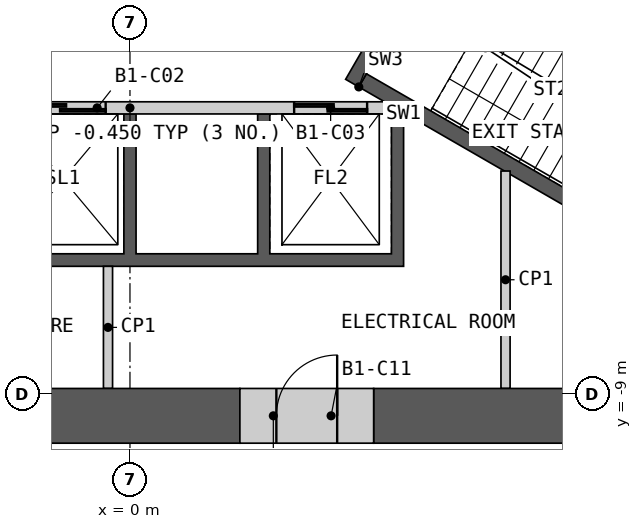
"""IFC4 building model, lengths in metres.
Left out: names, types, materials, properties, quantities, classifications, styles, units other than length and angle.
Written with IfcOpenShell. Run it as: python <this file> out.ifc"""

import sys

from ifc_helpers import new_model, si_unit, direction, frame, frame_2d, origin, place, context, subcontext, project, spatial, polyline, rectangle, outline, extrude, element, fill, save


model = new_model("IFC4")
c1 = context("Model", 3, precision=1e-05, world=origin(), true_north=direction((0.0, 1.0)))
c2 = subcontext(c1, "Body", "Model", "MODEL_VIEW")
j1 = project(units=[si_unit("LENGTHUNIT", "METRE"), si_unit("PLANEANGLEUNIT", "RADIAN")], contexts=[c1])
p1 = place(None, origin())
s1 = spatial("IfcSite", under=j1, at=p1, CompositionType="ELEMENT")
p2 = place(p1, origin())
s2 = spatial("IfcBuilding", under=s1, at=p2, CompositionType="ELEMENT")
p3 = place(p2, frame((0.0, 0.0, -4.2)))
s3 = spatial("IfcBuildingStorey", under=s2, at=p3, CompositionType="ELEMENT", Elevation=-4.2)
p4 = place(p3, frame((31.74, -10.542, 0.0), z_axis=(0.0, 0.0, 1.0), x_axis=(-0.500000005698, 0.866025400495, 0.0)))
e1 = element("IfcWall", 1, at=p4, inside=s3, PredefinedType="SOLIDWALL", context=c2, shape_type="SweptSolid", body=[
    extrude(rectangle(XDim=50.0, YDim=0.6, at=frame_2d((25.0, 0.0))), origin(), (0.0, 0.0, 1.0), 3.75),
])
p5 = place(p3, origin())
e2 = element("IfcWall", 2, at=p5, inside=s3, PredefinedType="SHEAR", context=c2, shape_type="SweptSolid", body=[
    extrude(outline(polyline([(4.5, -4.4), (4.5, -6.906), (-4.5, -6.906), (-4.5, -4.4), (-4.3, -4.4), (-4.3, -6.7), (-2.3, -6.7), (-2.3, -4.4), (-2.1, -4.4), (-2.1, -6.7), (-0.1, -6.7), (-0.1, -4.4), (0.1, -4.4), (0.1, -6.7), (2.1, -6.7), (2.1, -4.4), (2.3, -4.4), (2.3, -6.7), (4.3, -6.7), (4.3, -4.4), (4.5, -4.4)])), origin(), (0.0, 0.0, 1.0), 3.75),
])
p6 = place(p3, frame((-4.187, -4.3, 0.0), z_axis=(0.0, 0.0, 1.0), x_axis=(1.0, 0.0, 0.0)))
e3 = element("IfcWall", 3, at=p6, inside=s3, PredefinedType="SOLIDWALL", context=c2, shape_type="SweptSolid", body=[
    extrude(rectangle(XDim=8.373, YDim=0.2, at=frame_2d((4.187, 0.0))), origin(), (0.0, 0.0, 1.0), 3.75),
])
p7 = place(p6, frame((0.287, 0.0, 0.0)))
e4 = element("IfcOpeningElement", 4, at=p7, cuts=e3, PredefinedType="OPENING", context=c2, shape_type="SweptSolid", body=[
    extrude(rectangle(XDim=1.2, YDim=2.1, at=frame_2d((0.6, 1.05))), frame((0.0, 0.11, 0.0), z_axis=(0.0, -1.0, 0.0), x_axis=(1.0, 0.0, 0.0)), (0.0, 0.0, 1.0), 0.22),
])
p8 = place(p6, frame((2.387, 0.0, 0.0)))
e5 = element("IfcOpeningElement", 5, at=p8, cuts=e3, PredefinedType="OPENING", context=c2, shape_type="SweptSolid", body=[
    extrude(rectangle(XDim=1.4, YDim=2.1, at=frame_2d((0.7, 1.05))), frame((0.0, 0.11, 0.0), z_axis=(0.0, -1.0, 0.0), x_axis=(1.0, 0.0, 0.0)), (0.0, 0.0, 1.0), 0.22),
])
p9 = place(p6, frame((6.887, 0.0, 0.0)))
e6 = element("IfcOpeningElement", 6, at=p9, cuts=e3, PredefinedType="OPENING", context=c2, shape_type="SweptSolid", body=[
    extrude(rectangle(XDim=1.2, YDim=2.1, at=frame_2d((0.6, 1.05))), frame((0.0, 0.11, 0.0), z_axis=(0.0, -1.0, 0.0), x_axis=(1.0, 0.0, 0.0)), (0.0, 0.0, 1.0), 0.22),
])
p10 = place(p3, origin())
e7 = element("IfcWall", 7, at=p10, inside=s3, PredefinedType="SHEAR", context=c2, shape_type="SweptSolid", body=[
    extrude(outline(polyline([(3.763, -3.956), (8.83, -6.881), (8.738, -6.539), (3.888, -3.739), (3.763, -3.956)])), origin(), (0.0, 0.0, 1.0), 3.75),
])
p11 = place(p3, origin())
e8 = element("IfcWall", 8, at=p11, inside=s3, PredefinedType="SHEAR", context=c2, shape_type="SweptSolid", body=[
    extrude(outline(polyline([(10.032, -4.298), (10.374, -4.206), (5.307, -1.281), (5.182, -1.498), (10.032, -4.298)])), origin(), (0.0, 0.0, 1.0), 3.75),
])
p12 = place(p3, frame((3.655, -3.893, 0.0), z_axis=(0.0, 0.0, 1.0), x_axis=(0.499982516597, 0.866035497597, 0.0)))
e9 = element("IfcWall", 9, at=p12, inside=s3, PredefinedType="SHEAR", context=c2, shape_type="SweptSolid", body=[
    extrude(rectangle(XDim=3.088, YDim=0.25, at=frame_2d((1.544, 0.0))), origin(), (0.0, 0.0, 1.0), 3.75),
])
p13 = place(p12, frame((0.994, 0.0, 0.0)))
e10 = element("IfcOpeningElement", 10, at=p13, cuts=e9, PredefinedType="OPENING", context=c2, shape_type="SweptSolid", body=[
    extrude(rectangle(XDim=1.1, YDim=2.1, at=frame_2d((0.55, 1.05))), frame((0.0, 0.135, 0.0), z_axis=(0.0, -1.0, 0.0), x_axis=(1.0, 0.0, 0.0)), (0.0, 0.0, 1.0), 0.27),
])
p14 = place(p3, frame((6.177, -8.915, 0.0), z_axis=(0.0, 0.0, 1.0), x_axis=(0.0, 1.0, 0.0)))
e11 = element("IfcWall", 11, at=p14, inside=s3, PredefinedType="PARTITIONING", context=c2, shape_type="SweptSolid", body=[
    extrude(rectangle(XDim=3.576, YDim=0.15, at=frame_2d((1.788, 0.0))), origin(), (0.0, 0.0, 1.0), 3.75),
])
p15 = place(p3, frame((-0.361, -8.915, 0.0), z_axis=(0.0, 0.0, 1.0), x_axis=(0.0, 1.0, 0.0)))
e12 = element("IfcWall", 12, at=p15, inside=s3, PredefinedType="PARTITIONING", context=c2, shape_type="SweptSolid", body=[
    extrude(rectangle(XDim=2.009, YDim=0.15, at=frame_2d((1.004, 0.0))), origin(), (0.0, 0.0, 1.0), 3.75),
])
p16 = place(p3, frame((4.008, -9.365, 0.0), z_axis=(0.0, 0.0, 1.0), x_axis=(1.0, 0.0, 0.0)))
e13 = element("IfcWall", 13, at=p16, inside=s3, PredefinedType="SHEAR", context=c2, shape_type="SweptSolid", body=[
    extrude(rectangle(XDim=5.739, YDim=0.9, at=frame_2d((2.869, 0.0))), origin(), (0.0, 0.0, 1.0), 3.75),
])
p17 = place(p3, frame((-1.55, -9.365, 0.0), z_axis=(0.0, 0.0, 1.0), x_axis=(1.0, 0.0, 0.0)))
e14 = element("IfcWall", 14, at=p17, inside=s3, PredefinedType="SHEAR", context=c2, shape_type="SweptSolid", body=[
    extrude(rectangle(XDim=3.357, YDim=0.9, at=frame_2d((1.679, 0.0))), origin(), (0.0, 0.0, 1.0), 3.75),
])
p18 = place(p3, frame((1.808, -9.365, 0.0), z_axis=(0.0, 0.0, 1.0), x_axis=(1.0, 0.0, 0.0)))
e15 = element("IfcWall", 15, at=p18, inside=s3, PredefinedType="SHEAR", context=c2, shape_type="SweptSolid", body=[
    extrude(rectangle(XDim=2.2, YDim=0.9, at=frame_2d((1.1, 0.0))), origin(), (0.0, 0.0, 1.0), 3.75),
])
p19 = place(p18, frame((0.6, 0.0, 0.0)))
e16 = element("IfcOpeningElement", 16, at=p19, cuts=e15, PredefinedType="OPENING", context=c2, shape_type="SweptSolid", body=[
    extrude(rectangle(XDim=1.0, YDim=2.1, at=frame_2d((0.5, 1.05))), frame((0.0, 0.46, 0.0), z_axis=(0.0, -1.0, 0.0), x_axis=(1.0, 0.0, 0.0)), (0.0, 0.0, 1.0), 0.92),
])
p20 = place(p8, origin())
e17 = element("IfcDoor", 17, at=p20, inside=s3, OperationType="SLIDING_TO_LEFT", PredefinedType="DOOR", context=c2, shape_type="SweptSolid", body=[
    extrude(rectangle(XDim=1.4, YDim=2.1, at=frame_2d((0.7, 1.05))), frame((0.0, 0.025, 0.0), z_axis=(0.0, -1.0, 0.0), x_axis=(1.0, 0.0, 0.0)), (0.0, 0.0, 1.0), 0.05),
])
fill(e5, e17)
p21 = place(p9, origin())
e18 = element("IfcDoor", 18, at=p21, inside=s3, OperationType="SLIDING_TO_LEFT", PredefinedType="DOOR", context=c2, shape_type="SweptSolid", body=[
    extrude(rectangle(XDim=1.2, YDim=2.1, at=frame_2d((0.6, 1.05))), frame((0.0, 0.025, 0.0), z_axis=(0.0, -1.0, 0.0), x_axis=(1.0, 0.0, 0.0)), (0.0, 0.0, 1.0), 0.05),
])
fill(e6, e18)
p22 = place(p19, origin())
e19 = element("IfcDoor", 19, at=p22, inside=s3, OperationType="SINGLE_SWING_RIGHT", PredefinedType="DOOR", context=c2, shape_type="SweptSolid", body=[
    extrude(rectangle(XDim=1.0, YDim=2.1, at=frame_2d((0.5, 1.05))), frame((0.0, 0.205, 0.0), z_axis=(0.0, -1.0, 0.0), x_axis=(1.0, 0.0, 0.0)), (0.0, 0.0, 1.0), 0.05),
])
fill(e16, e19)
save(model, sys.argv[1])
